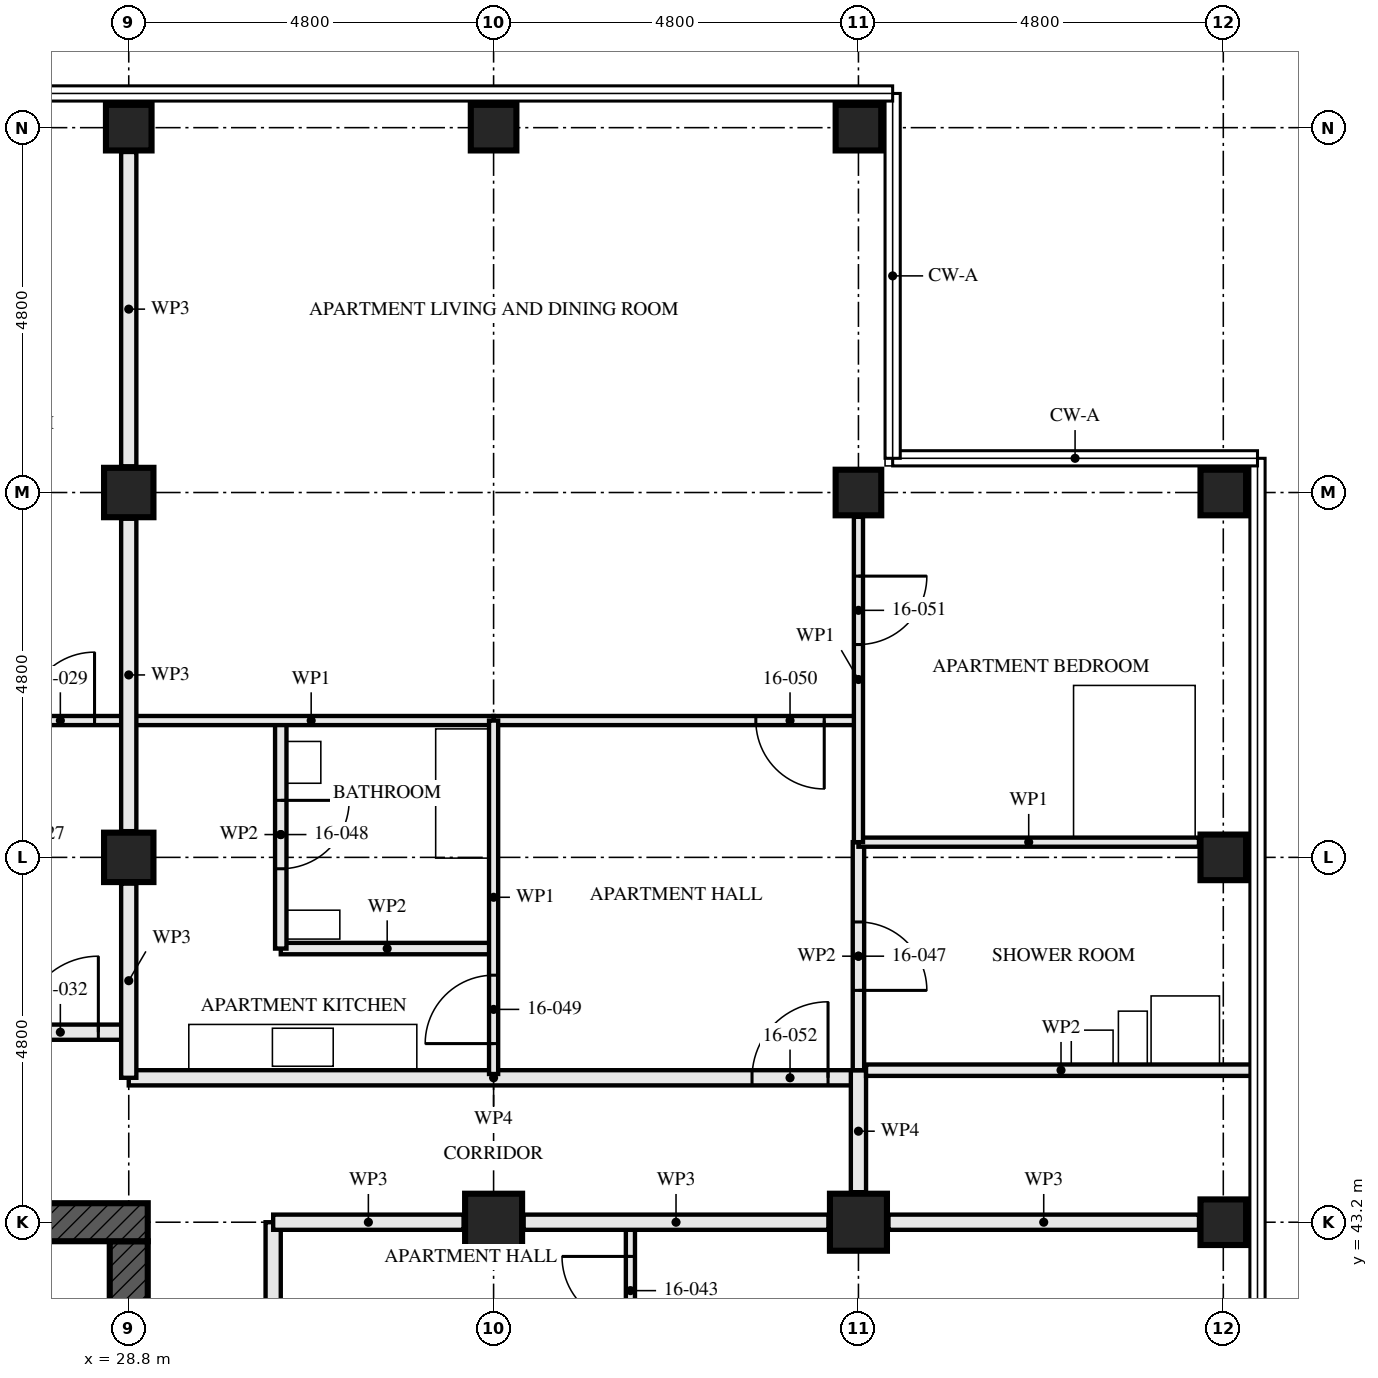
"""IFC4 building model, lengths in metres.
Left out: names, types, materials, properties, quantities, classifications, styles, units other than length and angle.
Written with IfcOpenShell. Run it as: python <this file> out.ifc"""

import sys

from ifc_helpers import new_model, si_unit, direction, frame, frame_2d, origin, origin_2d, place, context, subcontext, project, spatial, rectangle, hollow_rectangle, extrude, element, fill, save


model = new_model("IFC4")
c1 = context("Model", 3, precision=1e-05, world=origin(), true_north=direction((0.0, 1.0)))
c2 = subcontext(c1, "Body", "Model", "MODEL_VIEW")
j1 = project(units=[si_unit("LENGTHUNIT", "METRE"), si_unit("PLANEANGLEUNIT", "RADIAN")], contexts=[c1])
p1 = place(None, origin())
s1 = spatial("IfcSite", under=j1, at=p1, CompositionType="ELEMENT")
p2 = place(p1, origin())
s2 = spatial("IfcBuilding", under=s1, at=p2, CompositionType="ELEMENT")
p3 = place(p2, frame((0.0, 0.0, 62.0)))
s3 = spatial("IfcBuildingStorey", under=s2, at=p3, CompositionType="ELEMENT", Elevation=62.0)
for number, where, z_axis, x_axis in (
    (1, (28.8, 48.0, 0.0), (0.0, 0.0, 1.0), (1.0, 0.0, 0.0)),
    (2, (28.8, 52.8, 0.0), (0.0, 0.0, 1.0), (1.0, 0.0, 0.0)),
):
    element("IfcColumn", number, at=place(p3, frame(where, z_axis=z_axis, x_axis=x_axis)), inside=s3, PredefinedType="COLUMN", context=c2, shape_type="SweptSolid", body=[
        extrude(hollow_rectangle(XDim=0.65, YDim=0.65, WallThickness=0.05, at=origin_2d()), origin(), (0.0, 0.0, 1.0), 3.5),
    ])
p4 = place(p3, frame((28.8, 57.6, 0.0), z_axis=(0.0, 0.0, 1.0), x_axis=(0.0, 1.0, 0.0)))
e3 = element("IfcColumn", 3, at=p4, inside=s3, PredefinedType="COLUMN", context=c2, shape_type="SweptSolid", body=[
    extrude(hollow_rectangle(XDim=0.6, YDim=0.6, WallThickness=0.08, at=origin_2d()), origin(), (0.0, 0.0, 1.0), 3.5),
])
p5 = place(p3, frame((33.6, 43.2, 0.0), z_axis=(0.0, 0.0, 1.0), x_axis=(0.0, 1.0, 0.0)))
e4 = element("IfcColumn", 4, at=p5, inside=s3, PredefinedType="COLUMN", context=c2, shape_type="SweptSolid", body=[
    extrude(hollow_rectangle(XDim=0.75, YDim=0.75, WallThickness=0.08, at=origin_2d()), origin(), (0.0, 0.0, 1.0), 3.5),
])
p6 = place(p3, frame((33.6, 57.6, 0.0), z_axis=(0.0, 0.0, 1.0), x_axis=(0.0, 1.0, 0.0)))
e5 = element("IfcColumn", 5, at=p6, inside=s3, PredefinedType="COLUMN", context=c2, shape_type="SweptSolid", body=[
    extrude(hollow_rectangle(XDim=0.6, YDim=0.6, WallThickness=0.08, at=origin_2d()), origin(), (0.0, 0.0, 1.0), 3.5),
])
p7 = place(p3, frame((38.4, 43.2, 0.0), z_axis=(0.0, 0.0, 1.0), x_axis=(0.0, 1.0, 0.0)))
e6 = element("IfcColumn", 6, at=p7, inside=s3, PredefinedType="COLUMN", context=c2, shape_type="SweptSolid", body=[
    extrude(hollow_rectangle(XDim=0.75, YDim=0.75, WallThickness=0.08, at=origin_2d()), origin(), (0.0, 0.0, 1.0), 3.5),
])
for number, where, z_axis, x_axis in (
    (7, (38.4, 52.8, 0.0), (0.0, 0.0, 1.0), (0.0, 1.0, 0.0)),
    (8, (38.4, 57.6, 0.0), (0.0, 0.0, 1.0), (0.0, 1.0, 0.0)),
    (9, (43.2, 43.2, 0.0), (0.0, 0.0, 1.0), (0.0, 1.0, 0.0)),
    (10, (43.2, 48.0, 0.0), (0.0, 0.0, 1.0), (1.0, 0.0, 0.0)),
    (11, (43.2, 52.8, 0.0), (0.0, 0.0, 1.0), (0.0, 1.0, 0.0)),
):
    element("IfcColumn", number, at=place(p3, frame(where, z_axis=z_axis, x_axis=x_axis)), inside=s3, PredefinedType="COLUMN", context=c2, shape_type="SweptSolid", body=[
        extrude(hollow_rectangle(XDim=0.6, YDim=0.6, WallThickness=0.08, at=origin_2d()), origin(), (0.0, 0.0, 1.0), 3.5),
    ])
p8 = place(p3, frame((29.05, 43.2, -0.17), z_axis=(0.0, 0.0, 1.0), x_axis=(-1.0, 0.0, 0.0)))
e12 = element("IfcWall", 12, at=p8, inside=s3, PredefinedType="SHEAR", context=c2, shape_type="SweptSolid", body=[
    extrude(rectangle(XDim=14.9, YDim=0.5, at=frame_2d((7.45, 0.0))), origin(), (0.0, 0.0, 1.0), 3.5),
])
p9 = place(p8, frame((6.85, 0.0, 0.17)))
e13 = element("IfcOpeningElement", 13, at=p9, cuts=e12, PredefinedType="OPENING", context=c2, shape_type="SweptSolid", body=[
    extrude(rectangle(XDim=1.2, YDim=2.1, at=frame_2d((0.6, 1.05))), frame((0.0, 0.26, 0.0), z_axis=(0.0, -1.0, 0.0), x_axis=(1.0, 0.0, 0.0)), (0.0, 0.0, 1.0), 0.521),
])
p10 = place(p3, frame((28.8, 29.05, -0.17), z_axis=(0.0, 0.0, 1.0), x_axis=(0.0, 1.0, 0.0)))
e14 = element("IfcWall", 14, at=p10, inside=s3, PredefinedType="SHEAR", context=c2, shape_type="SweptSolid", body=[
    extrude(rectangle(XDim=13.9, YDim=0.5, at=frame_2d((6.95, 0.0))), origin(), (0.0, 0.0, 1.0), 3.5),
])
p11 = place(p10, frame((6.35, 0.0, 0.17)))
e15 = element("IfcOpeningElement", 15, at=p11, cuts=e14, PredefinedType="OPENING", context=c2, shape_type="SweptSolid", body=[
    extrude(rectangle(XDim=1.2, YDim=2.1, at=frame_2d((0.6, 1.05))), frame((0.0, 0.26, 0.0), z_axis=(0.0, -1.0, 0.0), x_axis=(1.0, 0.0, 0.0)), (0.0, 0.0, 1.0), 0.521),
])
p12 = place(p3, frame((28.8, 49.8, 0.0), z_axis=(0.0, 0.0, 1.0), x_axis=(-1.0, 0.0, 0.0)))
e16 = element("IfcWall", 16, at=p12, inside=s3, PredefinedType="PARTITIONING", context=c2, shape_type="SweptSolid", body=[
    extrude(rectangle(XDim=4.8, YDim=0.12, at=frame_2d((2.4, 0.0))), origin(), (0.0, 0.0, 1.0), 3.33),
])
p13 = place(p12, frame((0.45, 0.0, 0.0)))
e17 = element("IfcOpeningElement", 17, at=p13, cuts=e16, PredefinedType="OPENING", context=c2, shape_type="SweptSolid", body=[
    extrude(rectangle(XDim=0.9, YDim=2.1, at=frame_2d((0.45, 1.05))), frame((0.0, 0.071, 0.0), z_axis=(0.0, -1.0, 0.0), x_axis=(1.0, 0.0, 0.0)), (0.0, 0.0, 1.0), 0.141),
])
p14 = place(p3, frame((28.8, 45.7, 0.0), z_axis=(0.0, 0.0, 1.0), x_axis=(-1.0, 0.0, 0.0)))
e18 = element("IfcWall", 18, at=p14, inside=s3, PredefinedType="PARTITIONING", context=c2, shape_type="SweptSolid", body=[
    extrude(rectangle(XDim=14.4, YDim=0.2, at=frame_2d((7.2, 0.0))), origin(), (0.0, 0.0, 1.0), 3.33),
])
p15 = place(p14, frame((0.4, 0.0, 0.0)))
e19 = element("IfcOpeningElement", 19, at=p15, cuts=e18, PredefinedType="OPENING", context=c2, shape_type="SweptSolid", body=[
    extrude(rectangle(XDim=1.0, YDim=2.1, at=frame_2d((0.5, 1.05))), frame((0.0, 0.111, 0.0), z_axis=(0.0, -1.0, 0.0), x_axis=(1.0, 0.0, 0.0)), (0.0, 0.0, 1.0), 0.221),
])
p16 = place(p3, frame((35.4, 38.4, 0.0), z_axis=(0.0, 0.0, 1.0), x_axis=(0.0, 1.0, 0.0)))
e20 = element("IfcWall", 20, at=p16, inside=s3, PredefinedType="PARTITIONING", context=c2, shape_type="SweptSolid", body=[
    extrude(rectangle(XDim=4.8, YDim=0.12, at=frame_2d((2.4, 0.0))), origin(), (0.0, 0.0, 1.0), 3.33),
])
p17 = place(p16, frame((3.45, 0.0, 0.0)))
e21 = element("IfcOpeningElement", 21, at=p17, cuts=e20, PredefinedType="OPENING", context=c2, shape_type="SweptSolid", body=[
    extrude(rectangle(XDim=0.9, YDim=2.1, at=frame_2d((0.45, 1.05))), frame((0.0, 0.071, 0.0), z_axis=(0.0, -1.0, 0.0), x_axis=(1.0, 0.0, 0.0)), (0.0, 0.0, 1.0), 0.141),
])
p18 = place(p3, frame((30.7, 28.8, 0.0), z_axis=(0.0, 0.0, 1.0), x_axis=(0.0, 1.0, 0.0)))
e22 = element("IfcWall", 22, at=p18, inside=s3, PredefinedType="PARTITIONING", context=c2, shape_type="SweptSolid", body=[
    extrude(rectangle(XDim=14.4, YDim=0.2, at=frame_2d((7.2, 0.0))), origin(), (0.0, 0.0, 1.0), 2.55),
])
p19 = place(p18, frame((1.4, 0.0, 0.0)))
e23 = element("IfcOpeningElement", 23, at=p19, cuts=e22, PredefinedType="OPENING", context=c2, shape_type="SweptSolid", body=[
    extrude(rectangle(XDim=1.0, YDim=2.1, at=frame_2d((0.5, 1.05))), frame((0.0, 0.111, 0.0), z_axis=(0.0, -1.0, 0.0), x_axis=(1.0, 0.0, 0.0)), (0.0, 0.0, 1.0), 0.221),
])
p20 = place(p18, frame((4.1, 0.0, 0.0)))
e24 = element("IfcOpeningElement", 24, at=p20, cuts=e22, PredefinedType="OPENING", context=c2, shape_type="SweptSolid", body=[
    extrude(rectangle(XDim=1.0, YDim=2.1, at=frame_2d((0.5, 1.05))), frame((0.0, 0.111, 0.0), z_axis=(0.0, -1.0, 0.0), x_axis=(1.0, 0.0, 0.0)), (0.0, 0.0, 1.0), 0.221),
])
p21 = place(p18, frame((10.0, 0.0, 0.0)))
e25 = element("IfcOpeningElement", 25, at=p21, cuts=e22, PredefinedType="OPENING", context=c2, shape_type="SweptSolid", body=[
    extrude(rectangle(XDim=1.0, YDim=2.1, at=frame_2d((0.5, 1.05))), frame((0.0, 0.111, 0.0), z_axis=(0.0, -1.0, 0.0), x_axis=(1.0, 0.0, 0.0)), (0.0, 0.0, 1.0), 0.221),
])
p22 = place(p3, frame((38.4, 48.2, 0.0), z_axis=(0.0, 0.0, 1.0), x_axis=(0.0, -1.0, 0.0)))
e26 = element("IfcWall", 26, at=p22, inside=s3, PredefinedType="PARTITIONING", context=c2, shape_type="SweptSolid", body=[
    extrude(rectangle(XDim=3.0, YDim=0.15, at=frame_2d((1.5, 0.0))), origin(), (0.0, 0.0, 1.0), 2.55),
])
p23 = place(p22, frame((1.05, 0.0, 0.0)))
e27 = element("IfcOpeningElement", 27, at=p23, cuts=e26, PredefinedType="OPENING", context=c2, shape_type="SweptSolid", body=[
    extrude(rectangle(XDim=0.9, YDim=2.1, at=frame_2d((0.45, 1.05))), frame((0.0, 0.085, 0.0), z_axis=(0.0, -1.0, 0.0), x_axis=(1.0, 0.0, 0.0)), (0.0, 0.0, 1.0), 0.171),
])
p24 = place(p3, frame((30.8, 49.8, 0.0), z_axis=(0.0, 0.0, 1.0), x_axis=(0.0, -1.0, 0.0)))
e28 = element("IfcWall", 28, at=p24, inside=s3, PredefinedType="PARTITIONING", context=c2, shape_type="SweptSolid", body=[
    extrude(rectangle(XDim=3.0, YDim=0.15, at=frame_2d((1.5, 0.0))), origin(), (0.0, 0.0, 1.0), 2.55),
])
p25 = place(p24, frame((1.05, 0.0, 0.0)))
e29 = element("IfcOpeningElement", 29, at=p25, cuts=e28, PredefinedType="OPENING", context=c2, shape_type="SweptSolid", body=[
    extrude(rectangle(XDim=0.9, YDim=2.1, at=frame_2d((0.45, 1.05))), frame((0.0, 0.085, 0.0), z_axis=(0.0, -1.0, 0.0), x_axis=(1.0, 0.0, 0.0)), (0.0, 0.0, 1.0), 0.171),
])
p26 = place(p3, frame((33.6, 46.8, 0.0), z_axis=(0.0, 0.0, 1.0), x_axis=(-1.0, 0.0, 0.0)))
e30 = element("IfcWall", 30, at=p26, inside=s3, PredefinedType="PARTITIONING", context=c2, shape_type="SweptSolid", body=[
    extrude(rectangle(XDim=2.8, YDim=0.15, at=frame_2d((1.4, 0.0))), origin(), (0.0, 0.0, 1.0), 3.33),
])
p27 = place(p3, frame((33.6, 49.8, 0.0), z_axis=(0.0, 0.0, 1.0), x_axis=(0.0, -1.0, 0.0)))
e31 = element("IfcWall", 31, at=p27, inside=s3, PredefinedType="PARTITIONING", context=c2, shape_type="SweptSolid", body=[
    extrude(rectangle(XDim=4.65, YDim=0.12, at=frame_2d((2.325, 0.0))), origin(), (0.0, 0.0, 1.0), 2.55),
])
p28 = place(p27, frame((3.35, 0.0, 0.0)))
e32 = element("IfcOpeningElement", 32, at=p28, cuts=e31, PredefinedType="OPENING", context=c2, shape_type="SweptSolid", body=[
    extrude(rectangle(XDim=0.9, YDim=2.1, at=frame_2d((0.45, 1.05))), frame((0.0, 0.071, 0.0), z_axis=(0.0, -1.0, 0.0), x_axis=(1.0, 0.0, 0.0)), (0.0, 0.0, 1.0), 0.141),
])
p29 = place(p3, frame((42.88, 48.2, 0.0), z_axis=(0.0, 0.0, 1.0), x_axis=(-1.0, 0.0, 0.0)))
e33 = element("IfcWall", 33, at=p29, inside=s3, PredefinedType="PARTITIONING", context=c2, shape_type="SweptSolid", body=[
    extrude(rectangle(XDim=4.48, YDim=0.12, at=frame_2d((2.24, 0.0))), origin(), (0.0, 0.0, 1.0), 3.33),
])
p30 = place(p3, frame((38.4, 49.8, 0.0), z_axis=(0.0, 0.0, 1.0), x_axis=(-1.0, 0.0, 0.0)))
e34 = element("IfcWall", 34, at=p30, inside=s3, PredefinedType="PARTITIONING", context=c2, shape_type="SweptSolid", body=[
    extrude(rectangle(XDim=4.8, YDim=0.12, at=frame_2d((2.4, 0.0))), origin(), (0.0, 0.0, 1.0), 3.33),
])
p31 = place(p30, frame((0.45, 0.0, 0.0)))
e35 = element("IfcOpeningElement", 35, at=p31, cuts=e34, PredefinedType="OPENING", context=c2, shape_type="SweptSolid", body=[
    extrude(rectangle(XDim=0.9, YDim=2.1, at=frame_2d((0.45, 1.05))), frame((0.0, 0.071, 0.0), z_axis=(0.0, -1.0, 0.0), x_axis=(1.0, 0.0, 0.0)), (0.0, 0.0, 1.0), 0.141),
])
p32 = place(p3, frame((33.6, 49.8, 0.0), z_axis=(0.0, 0.0, 1.0), x_axis=(-1.0, 0.0, 0.0)))
e36 = element("IfcWall", 36, at=p32, inside=s3, PredefinedType="PARTITIONING", context=c2, shape_type="SweptSolid", body=[
    extrude(rectangle(XDim=4.8, YDim=0.12, at=frame_2d((2.4, 0.0))), origin(), (0.0, 0.0, 1.0), 3.33),
])
p33 = place(p3, frame((38.4, 52.48, 0.0), z_axis=(0.0, 0.0, 1.0), x_axis=(0.0, -1.0, 0.0)))
e37 = element("IfcWall", 37, at=p33, inside=s3, PredefinedType="PARTITIONING", context=c2, shape_type="SweptSolid", body=[
    extrude(rectangle(XDim=4.28, YDim=0.12, at=frame_2d((2.14, 0.0))), origin(), (0.0, 0.0, 1.0), 3.33),
])
p34 = place(p33, frame((0.78, 0.0, 0.0)))
e38 = element("IfcOpeningElement", 38, at=p34, cuts=e37, PredefinedType="OPENING", context=c2, shape_type="SweptSolid", body=[
    extrude(rectangle(XDim=0.9, YDim=2.1, at=frame_2d((0.45, 1.05))), frame((0.0, 0.071, 0.0), z_axis=(0.0, -1.0, 0.0), x_axis=(1.0, 0.0, 0.0)), (0.0, 0.0, 1.0), 0.141),
])
p35 = place(p3, frame((38.4, 45.1, 0.0), z_axis=(0.0, 0.0, 1.0), x_axis=(-1.0, 0.0, 0.0)))
e39 = element("IfcWall", 39, at=p35, inside=s3, PredefinedType="PARTITIONING", context=c2, shape_type="SweptSolid", body=[
    extrude(rectangle(XDim=9.6, YDim=0.2, at=frame_2d((4.8, 0.0))), origin(), (0.0, 0.0, 1.0), 3.33),
])
p36 = place(p35, frame((0.4, 0.0, 0.0)))
e40 = element("IfcOpeningElement", 40, at=p36, cuts=e39, PredefinedType="OPENING", context=c2, shape_type="SweptSolid", body=[
    extrude(rectangle(XDim=1.0, YDim=2.1, at=frame_2d((0.5, 1.05))), frame((0.0, 0.111, 0.0), z_axis=(0.0, -1.0, 0.0), x_axis=(1.0, 0.0, 0.0)), (0.0, 0.0, 1.0), 0.221),
])
p37 = place(p3, frame((38.4, 45.2, 0.0), z_axis=(0.0, 0.0, 1.0), x_axis=(0.0, -1.0, 0.0)))
e41 = element("IfcWall", 41, at=p37, inside=s3, PredefinedType="PARTITIONING", context=c2, shape_type="SweptSolid", body=[
    extrude(rectangle(XDim=1.605, YDim=0.2, at=frame_2d((0.802, 0.0))), origin(), (0.0, 0.0, 1.0), 3.33),
])
p38 = place(p3, frame((28.8, 45.1, 0.0), z_axis=(0.0, 0.0, 1.0), x_axis=(0.0, 1.0, 0.0)))
e42 = element("IfcWall", 42, at=p38, inside=s3, PredefinedType="PARTITIONING", context=c2, shape_type="SweptSolid", body=[
    extrude(rectangle(XDim=2.555, YDim=0.2, at=frame_2d((1.277, 0.0))), origin(), (0.0, 0.0, 1.0), 2.32),
])
p39 = place(p3, frame((28.8, 48.345, 0.0), z_axis=(0.0, 0.0, 1.0), x_axis=(0.0, 1.0, 0.0)))
e43 = element("IfcWall", 43, at=p39, inside=s3, PredefinedType="PARTITIONING", context=c2, shape_type="SweptSolid", body=[
    extrude(rectangle(XDim=4.11, YDim=0.2, at=frame_2d((2.055, 0.0))), origin(), (0.0, 0.0, 1.0), 2.32),
])
p40 = place(p3, frame((28.8, 53.145, 0.0), z_axis=(0.0, 0.0, 1.0), x_axis=(0.0, 1.0, 0.0)))
e44 = element("IfcWall", 44, at=p40, inside=s3, PredefinedType="PARTITIONING", context=c2, shape_type="SweptSolid", body=[
    extrude(rectangle(XDim=4.135, YDim=0.2, at=frame_2d((2.067, 0.0))), origin(), (0.0, 0.0, 1.0), 2.32),
])
p41 = place(p3, frame((42.88, 43.2, 0.0), z_axis=(0.0, 0.0, 1.0), x_axis=(-1.0, 0.0, 0.0)))
e45 = element("IfcWall", 45, at=p41, inside=s3, PredefinedType="PARTITIONING", context=c2, shape_type="SweptSolid", body=[
    extrude(rectangle(XDim=4.085, YDim=0.2, at=frame_2d((2.042, 0.0))), origin(), (0.0, 0.0, 1.0), 2.32),
])
p42 = place(p3, frame((38.005, 43.2, 0.0), z_axis=(0.0, 0.0, 1.0), x_axis=(-1.0, 0.0, 0.0)))
e46 = element("IfcWall", 46, at=p42, inside=s3, PredefinedType="PARTITIONING", context=c2, shape_type="SweptSolid", body=[
    extrude(rectangle(XDim=4.01, YDim=0.2, at=frame_2d((2.005, 0.0))), origin(), (0.0, 0.0, 1.0), 2.32),
])
p43 = place(p3, frame((33.205, 43.2, 0.0), z_axis=(0.0, 0.0, 1.0), x_axis=(-1.0, 0.0, 0.0)))
e47 = element("IfcWall", 47, at=p43, inside=s3, PredefinedType="PARTITIONING", context=c2, shape_type="SweptSolid", body=[
    extrude(rectangle(XDim=2.505, YDim=0.2, at=frame_2d((1.252, 0.0))), origin(), (0.0, 0.0, 1.0), 2.32),
])
p44 = place(p3, frame((43.63, 45.2, 0.0), z_axis=(0.0, 0.0, 1.0), x_axis=(-1.0, 0.0, 0.0)))
e48 = element("IfcWall", 48, at=p44, inside=s3, PredefinedType="PARTITIONING", context=c2, shape_type="SweptSolid", body=[
    extrude(rectangle(XDim=5.13, YDim=0.15, at=frame_2d((2.565, 0.0))), origin(), (0.0, 0.0, 1.0), 2.32),
])
p45 = place(p13, frame((0.9, 0.0, 0.0), z_axis=(0.0, 0.0, 1.0), x_axis=(-1.0, 0.0, 0.0)))
e49 = element("IfcDoor", 49, at=p45, inside=s3, OperationType="SINGLE_SWING_LEFT", PredefinedType="DOOR", context=c2, shape_type="SweptSolid", body=[
    extrude(rectangle(XDim=0.9, YDim=2.1, at=frame_2d((0.45, 1.05))), frame((0.0, 0.022, 0.0), z_axis=(0.0, -1.0, 0.0), x_axis=(1.0, 0.0, 0.0)), (0.0, 0.0, 1.0), 0.044),
])
fill(e17, e49)
p46 = place(p15, frame((1.0, 0.0, 0.0), z_axis=(0.0, 0.0, 1.0), x_axis=(-1.0, 0.0, 0.0)))
e50 = element("IfcDoor", 50, at=p46, inside=s3, OperationType="SINGLE_SWING_LEFT", PredefinedType="DOOR", context=c2, shape_type="SweptSolid", body=[
    extrude(rectangle(XDim=1.0, YDim=2.1, at=frame_2d((0.5, 1.05))), frame((0.0, 0.027, 0.0), z_axis=(0.0, -1.0, 0.0), x_axis=(1.0, 0.0, 0.0)), (0.0, 0.0, 1.0), 0.054),
])
fill(e19, e50)
p47 = place(p17, origin())
e51 = element("IfcDoor", 51, at=p47, inside=s3, OperationType="SINGLE_SWING_LEFT", PredefinedType="DOOR", context=c2, shape_type="SweptSolid", body=[
    extrude(rectangle(XDim=0.9, YDim=2.1, at=frame_2d((0.45, 1.05))), frame((0.0, 0.022, 0.0), z_axis=(0.0, -1.0, 0.0), x_axis=(1.0, 0.0, 0.0)), (0.0, 0.0, 1.0), 0.044),
])
fill(e21, e51)
p48 = place(p23, origin())
e52 = element("IfcDoor", 52, at=p48, inside=s3, OperationType="SINGLE_SWING_LEFT", PredefinedType="DOOR", context=c2, shape_type="SweptSolid", body=[
    extrude(rectangle(XDim=0.9, YDim=2.1, at=frame_2d((0.45, 1.05))), frame((0.0, 0.022, 0.0), z_axis=(0.0, -1.0, 0.0), x_axis=(1.0, 0.0, 0.0)), (0.0, 0.0, 1.0), 0.044),
])
fill(e27, e52)
p49 = place(p25, origin())
e53 = element("IfcDoor", 53, at=p49, inside=s3, OperationType="SINGLE_SWING_RIGHT", PredefinedType="DOOR", context=c2, shape_type="SweptSolid", body=[
    extrude(rectangle(XDim=0.9, YDim=2.1, at=frame_2d((0.45, 1.05))), frame((0.0, 0.022, 0.0), z_axis=(0.0, -1.0, 0.0), x_axis=(1.0, 0.0, 0.0)), (0.0, 0.0, 1.0), 0.044),
])
fill(e29, e53)
p50 = place(p28, frame((0.9, 0.0, 0.0), z_axis=(0.0, 0.0, 1.0), x_axis=(-1.0, 0.0, 0.0)))
e54 = element("IfcDoor", 54, at=p50, inside=s3, OperationType="SINGLE_SWING_RIGHT", PredefinedType="DOOR", context=c2, shape_type="SweptSolid", body=[
    extrude(rectangle(XDim=0.9, YDim=2.1, at=frame_2d((0.45, 1.05))), frame((0.0, 0.022, 0.0), z_axis=(0.0, -1.0, 0.0), x_axis=(1.0, 0.0, 0.0)), (0.0, 0.0, 1.0), 0.044),
])
fill(e32, e54)
p51 = place(p31, origin())
e55 = element("IfcDoor", 55, at=p51, inside=s3, OperationType="SINGLE_SWING_RIGHT", PredefinedType="DOOR", context=c2, shape_type="SweptSolid", body=[
    extrude(rectangle(XDim=0.9, YDim=2.1, at=frame_2d((0.45, 1.05))), frame((0.0, 0.022, 0.0), z_axis=(0.0, -1.0, 0.0), x_axis=(1.0, 0.0, 0.0)), (0.0, 0.0, 1.0), 0.044),
])
fill(e35, e55)
p52 = place(p34, origin())
e56 = element("IfcDoor", 56, at=p52, inside=s3, OperationType="SINGLE_SWING_RIGHT", PredefinedType="DOOR", context=c2, shape_type="SweptSolid", body=[
    extrude(rectangle(XDim=0.9, YDim=2.1, at=frame_2d((0.45, 1.05))), frame((0.0, 0.022, 0.0), z_axis=(0.0, -1.0, 0.0), x_axis=(1.0, 0.0, 0.0)), (0.0, 0.0, 1.0), 0.044),
])
fill(e38, e56)
p53 = place(p36, frame((1.0, 0.0, 0.0), z_axis=(0.0, 0.0, 1.0), x_axis=(-1.0, 0.0, 0.0)))
e57 = element("IfcDoor", 57, at=p53, inside=s3, OperationType="SINGLE_SWING_LEFT", PredefinedType="DOOR", context=c2, shape_type="SweptSolid", body=[
    extrude(rectangle(XDim=1.0, YDim=2.1, at=frame_2d((0.5, 1.05))), frame((0.0, 0.027, 0.0), z_axis=(0.0, -1.0, 0.0), x_axis=(1.0, 0.0, 0.0)), (0.0, 0.0, 1.0), 0.054),
])
fill(e40, e57)
save(model, sys.argv[1])
